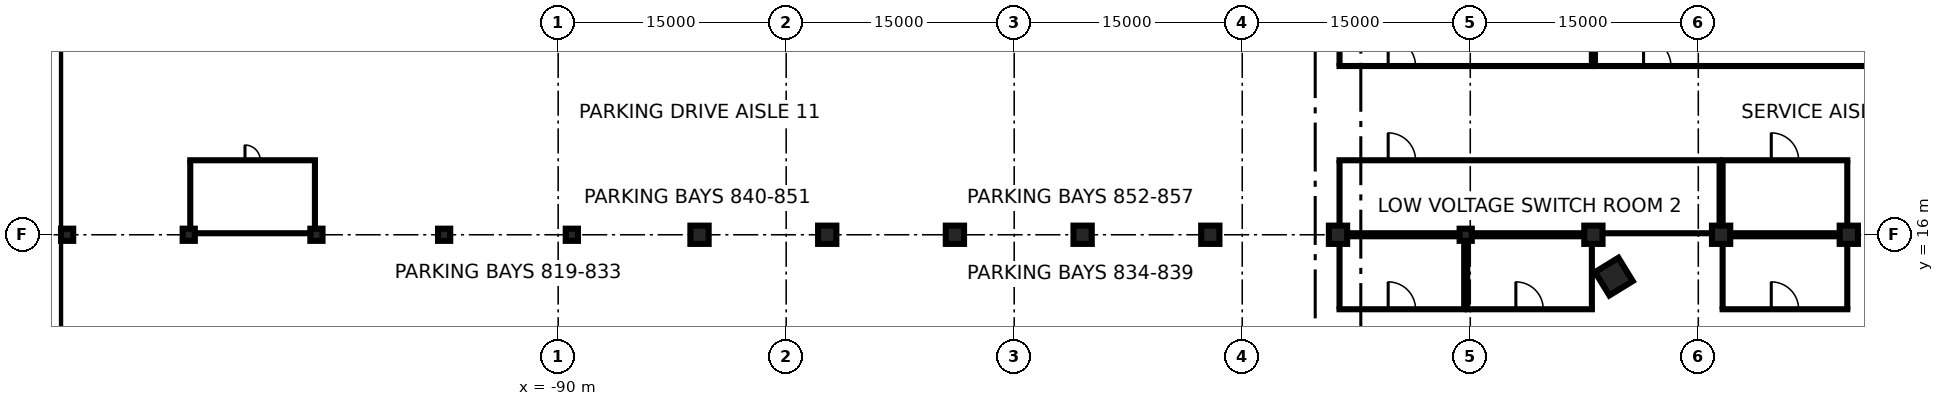
"""IFC4 building model, lengths in metres.
Left out: names, types, materials, properties, quantities, classifications, styles, units other than length and angle.
Written with IfcOpenShell. Run it as: python <this file> out.ifc"""

import sys

from ifc_helpers import new_model, si_unit, direction, frame, frame_2d, origin, origin_2d, place, context, subcontext, project, spatial, rectangle, extrude, element, fill, save


model = new_model("IFC4")
c1 = context("Model", 3, precision=1e-05, world=origin(), true_north=direction((0.0, 1.0)))
c2 = subcontext(c1, "Body", "Model", "MODEL_VIEW")
j1 = project(units=[si_unit("LENGTHUNIT", "METRE"), si_unit("PLANEANGLEUNIT", "RADIAN")], contexts=[c1])
p1 = place(None, origin())
s1 = spatial("IfcSite", under=j1, at=p1, CompositionType="ELEMENT")
p2 = place(p1, origin())
s2 = spatial("IfcBuilding", under=s1, at=p2, CompositionType="ELEMENT")
p3 = place(p2, frame((0.0, 0.0, -12.0)))
s3 = spatial("IfcBuildingStorey", under=s2, at=p3, CompositionType="ELEMENT", Elevation=-12.0)
p4 = place(p3, frame((-123.15, -80.0, 0.0), z_axis=(0.0, 0.0, 1.0), x_axis=(0.0, 1.0, 0.0)))
e1 = element("IfcWall", 1, at=p4, inside=s3, PredefinedType="USERDEFINED", context=c2, shape_type="SweptSolid", body=[
    extrude(rectangle(XDim=160.0, YDim=0.9, at=frame_2d((80.0, 0.0))), origin(), (0.0, 0.0, 1.0), 11.55),
])
p5 = place(p2, frame((0.0, 0.0, -7.2)))
s4 = spatial("IfcBuildingStorey", under=s2, at=p5, CompositionType="ELEMENT", Elevation=-7.2)
p6 = place(p5, frame((-20.552, 13.248, -0.4), z_axis=(0.0, 0.0, 1.0), x_axis=(-0.523429826947, 0.85206878611, 0.0)))
e2 = element("IfcColumn", 2, at=p6, inside=s4, PredefinedType="COLUMN", context=c2, shape_type="SweptSolid", body=[
    extrude(rectangle(XDim=1.8, YDim=1.8, at=origin_2d()), origin(), (0.0, 0.0, 1.0), 3.6),
])
for number, where, z_axis, x_axis in (
    (3, (-122.3, 16.0, -0.4), (0.0, 0.0, 1.0), (1.0, 0.0, 0.0)),
    (4, (-114.3, 16.0, -0.4), (0.0, 0.0, 1.0), (1.0, 0.0, 0.0)),
    (5, (-105.9, 16.0, -0.4), (0.0, 0.0, 1.0), (1.0, 0.0, 0.0)),
    (6, (-97.5, 16.0, -0.4), (0.0, 0.0, 1.0), (1.0, 0.0, 0.0)),
    (7, (-89.1, 16.0, -0.4), (0.0, 0.0, 1.0), (1.0, 0.0, 0.0)),
):
    element("IfcColumn", number, at=place(p5, frame(where, z_axis=z_axis, x_axis=x_axis)), inside=s4, PredefinedType="COLUMN", context=c2, shape_type="SweptSolid", body=[
        extrude(rectangle(XDim=0.8, YDim=0.8, at=origin_2d()), origin(), (0.0, 0.0, 1.0), 3.6),
    ])
for number, where, z_axis, x_axis in (
    (8, (-80.7, 16.0, -0.4), (0.0, 0.0, 1.0), (1.0, 0.0, 0.0)),
    (9, (-72.3, 16.0, -0.4), (0.0, 0.0, 1.0), (1.0, 0.0, 0.0)),
    (10, (-63.9, 16.0, -0.4), (0.0, 0.0, 1.0), (1.0, 0.0, 0.0)),
    (11, (-55.5, 16.0, -0.4), (0.0, 0.0, 1.0), (1.0, 0.0, 0.0)),
    (12, (-47.1, 16.0, -0.4), (0.0, 0.0, 1.0), (1.0, 0.0, 0.0)),
    (13, (-38.7, 16.0, -0.4), (0.0, 0.0, 1.0), (1.0, 0.0, 0.0)),
):
    element("IfcColumn", number, at=place(p5, frame(where, z_axis=z_axis, x_axis=x_axis)), inside=s4, PredefinedType="COLUMN", context=c2, shape_type="SweptSolid", body=[
        extrude(rectangle(XDim=1.2, YDim=1.2, at=origin_2d()), origin(), (0.0, 0.0, 1.0), 3.6),
    ])
p7 = place(p5, frame((-30.3, 16.0, -0.4), z_axis=(0.0, 0.0, 1.0), x_axis=(1.0, 0.0, 0.0)))
e14 = element("IfcColumn", 14, at=p7, inside=s4, PredefinedType="COLUMN", context=c2, shape_type="SweptSolid", body=[
    extrude(rectangle(XDim=0.8, YDim=0.8, at=origin_2d()), origin(), (0.0, 0.0, 1.0), 3.6),
])
for number, where, z_axis, x_axis in (
    (15, (-21.9, 16.0, -0.4), (0.0, 0.0, 1.0), (1.0, 0.0, 0.0)),
    (16, (-13.5, 16.0, -0.4), (0.0, 0.0, 1.0), (1.0, 0.0, 0.0)),
    (17, (-5.1, 16.0, -0.4), (0.0, 0.0, 1.0), (1.0, 0.0, 0.0)),
):
    element("IfcColumn", number, at=place(p5, frame(where, z_axis=z_axis, x_axis=x_axis)), inside=s4, PredefinedType="COLUMN", context=c2, shape_type="SweptSolid", body=[
        extrude(rectangle(XDim=1.2, YDim=1.2, at=origin_2d()), origin(), (0.0, 0.0, 1.0), 3.6),
    ])
p8 = place(p5, frame((-38.7, 11.1, 0.0), z_axis=(0.0, 0.0, 1.0), x_axis=(1.0, 0.0, 0.0)))
e18 = element("IfcWall", 18, at=p8, inside=s4, PredefinedType="PARTITIONING", context=c2, shape_type="SweptSolid", body=[
    extrude(rectangle(XDim=8.4, YDim=0.2, at=frame_2d((4.2, 0.0))), origin(), (0.0, 0.0, 1.0), 3.2),
])
p9 = place(p8, frame((3.3, 0.0, 0.0)))
e19 = element("IfcOpeningElement", 19, at=p9, cuts=e18, PredefinedType="OPENING", context=c2, shape_type="SweptSolid", body=[
    extrude(rectangle(XDim=1.8, YDim=2.1, at=frame_2d((0.9, 1.05))), frame((0.0, 0.11, 0.0), z_axis=(0.0, -1.0, 0.0), x_axis=(1.0, 0.0, 0.0)), (0.0, 0.0, 1.0), 0.22),
])
p10 = place(p5, frame((-38.7, 15.9, 0.0), z_axis=(0.0, 0.0, 1.0), x_axis=(1.0, 0.0, 0.0)))
e20 = element("IfcWall", 20, at=p10, inside=s4, PredefinedType="PARTITIONING", context=c2, shape_type="SweptSolid", body=[
    extrude(rectangle(XDim=8.4, YDim=0.2, at=frame_2d((4.2, 0.0))), origin(), (0.0, 0.0, 1.0), 3.2),
])
p11 = place(p5, frame((-38.6, 11.2, 0.0), z_axis=(0.0, 0.0, 1.0), x_axis=(0.0, 1.0, 0.0)))
e21 = element("IfcWall", 21, at=p11, inside=s4, PredefinedType="PARTITIONING", context=c2, shape_type="SweptSolid", body=[
    extrude(rectangle(XDim=4.2, YDim=0.2, at=frame_2d((2.1, 0.0))), origin(), (0.0, 0.0, 1.0), 3.2),
])
p12 = place(p5, frame((-30.4, 11.2, 0.0), z_axis=(0.0, 0.0, 1.0), x_axis=(0.0, 1.0, 0.0)))
e22 = element("IfcWall", 22, at=p12, inside=s4, PredefinedType="PARTITIONING", context=c2, shape_type="SweptSolid", body=[
    extrude(rectangle(XDim=4.4, YDim=0.2, at=frame_2d((2.2, 0.0))), origin(), (0.0, 0.0, 1.0), 3.2),
])
p13 = place(p5, frame((-30.3, 11.1, 0.0), z_axis=(0.0, 0.0, 1.0), x_axis=(1.0, 0.0, 0.0)))
e23 = element("IfcWall", 23, at=p13, inside=s4, PredefinedType="PARTITIONING", context=c2, shape_type="SweptSolid", body=[
    extrude(rectangle(XDim=8.4, YDim=0.2, at=frame_2d((4.2, 0.0))), origin(), (0.0, 0.0, 1.0), 3.2),
])
p14 = place(p13, frame((3.3, 0.0, 0.0)))
e24 = element("IfcOpeningElement", 24, at=p14, cuts=e23, PredefinedType="OPENING", context=c2, shape_type="SweptSolid", body=[
    extrude(rectangle(XDim=1.8, YDim=2.1, at=frame_2d((0.9, 1.05))), frame((0.0, 0.11, 0.0), z_axis=(0.0, -1.0, 0.0), x_axis=(1.0, 0.0, 0.0)), (0.0, 0.0, 1.0), 0.22),
])
p15 = place(p5, frame((-30.3, 15.9, 0.0), z_axis=(0.0, 0.0, 1.0), x_axis=(1.0, 0.0, 0.0)))
e25 = element("IfcWall", 25, at=p15, inside=s4, PredefinedType="PARTITIONING", context=c2, shape_type="SweptSolid", body=[
    extrude(rectangle(XDim=8.4, YDim=0.2, at=frame_2d((4.2, 0.0))), origin(), (0.0, 0.0, 1.0), 3.2),
])
p16 = place(p5, frame((-30.2, 11.2, 0.0), z_axis=(0.0, 0.0, 1.0), x_axis=(0.0, 1.0, 0.0)))
e26 = element("IfcWall", 26, at=p16, inside=s4, PredefinedType="PARTITIONING", context=c2, shape_type="SweptSolid", body=[
    extrude(rectangle(XDim=4.4, YDim=0.2, at=frame_2d((2.2, 0.0))), origin(), (0.0, 0.0, 1.0), 3.2),
])
p17 = place(p5, frame((-22.0, 11.2, 0.0), z_axis=(0.0, 0.0, 1.0), x_axis=(0.0, 1.0, 0.0)))
e27 = element("IfcWall", 27, at=p17, inside=s4, PredefinedType="PARTITIONING", context=c2, shape_type="SweptSolid", body=[
    extrude(rectangle(XDim=4.2, YDim=0.2, at=frame_2d((2.1, 0.0))), origin(), (0.0, 0.0, 1.0), 3.2),
])
p18 = place(p5, frame((-13.5, 11.1, 0.0), z_axis=(0.0, 0.0, 1.0), x_axis=(1.0, 0.0, 0.0)))
e28 = element("IfcWall", 28, at=p18, inside=s4, PredefinedType="PARTITIONING", context=c2, shape_type="SweptSolid", body=[
    extrude(rectangle(XDim=8.4, YDim=0.2, at=frame_2d((4.2, 0.0))), origin(), (0.0, 0.0, 1.0), 3.2),
])
p19 = place(p18, frame((3.3, 0.0, 0.0)))
e29 = element("IfcOpeningElement", 29, at=p19, cuts=e28, PredefinedType="OPENING", context=c2, shape_type="SweptSolid", body=[
    extrude(rectangle(XDim=1.8, YDim=2.1, at=frame_2d((0.9, 1.05))), frame((0.0, 0.11, 0.0), z_axis=(0.0, -1.0, 0.0), x_axis=(1.0, 0.0, 0.0)), (0.0, 0.0, 1.0), 0.22),
])
p20 = place(p5, frame((-13.5, 15.9, 0.0), z_axis=(0.0, 0.0, 1.0), x_axis=(1.0, 0.0, 0.0)))
e30 = element("IfcWall", 30, at=p20, inside=s4, PredefinedType="PARTITIONING", context=c2, shape_type="SweptSolid", body=[
    extrude(rectangle(XDim=8.4, YDim=0.2, at=frame_2d((4.2, 0.0))), origin(), (0.0, 0.0, 1.0), 3.2),
])
for number, where, z_axis, x_axis in (
    (31, (-13.4, 11.2, 0.0), (0.0, 0.0, 1.0), (0.0, 1.0, 0.0)),
    (32, (-5.2, 11.2, 0.0), (0.0, 0.0, 1.0), (0.0, 1.0, 0.0)),
):
    element("IfcWall", number, at=place(p5, frame(where, z_axis=z_axis, x_axis=x_axis)), inside=s4, PredefinedType="PARTITIONING", context=c2, shape_type="SweptSolid", body=[
        extrude(rectangle(XDim=4.2, YDim=0.2, at=frame_2d((2.1, 0.0))), origin(), (0.0, 0.0, 1.0), 3.2),
    ])
p21 = place(p5, frame((-38.7, 16.1, 0.0), z_axis=(0.0, 0.0, 1.0), x_axis=(1.0, 0.0, 0.0)))
e33 = element("IfcWall", 33, at=p21, inside=s4, PredefinedType="PARTITIONING", context=c2, shape_type="SweptSolid", body=[
    extrude(rectangle(XDim=25.2, YDim=0.2, at=frame_2d((12.6, 0.0))), origin(), (0.0, 0.0, 1.0), 3.2),
])
p22 = place(p5, frame((-38.7, 20.9, 0.0), z_axis=(0.0, 0.0, 1.0), x_axis=(1.0, 0.0, 0.0)))
e34 = element("IfcWall", 34, at=p22, inside=s4, PredefinedType="PARTITIONING", context=c2, shape_type="SweptSolid", body=[
    extrude(rectangle(XDim=25.2, YDim=0.2, at=frame_2d((12.6, 0.0))), origin(), (0.0, 0.0, 1.0), 3.2),
])
p23 = place(p22, frame((3.3, 0.0, 0.0)))
e35 = element("IfcOpeningElement", 35, at=p23, cuts=e34, PredefinedType="OPENING", context=c2, shape_type="SweptSolid", body=[
    extrude(rectangle(XDim=1.8, YDim=2.1, at=frame_2d((0.9, 1.05))), frame((0.0, 0.11, 0.0), z_axis=(0.0, -1.0, 0.0), x_axis=(1.0, 0.0, 0.0)), (0.0, 0.0, 1.0), 0.22),
])
for number, where, z_axis, x_axis in (
    (36, (-38.6, 16.6, 0.0), (0.0, 0.0, 1.0), (0.0, 1.0, 0.0)),
    (37, (-13.6, 16.6, 0.0), (0.0, 0.0, 1.0), (0.0, 1.0, 0.0)),
):
    element("IfcWall", number, at=place(p5, frame(where, z_axis=z_axis, x_axis=x_axis)), inside=s4, PredefinedType="PARTITIONING", context=c2, shape_type="SweptSolid", body=[
        extrude(rectangle(XDim=4.2, YDim=0.2, at=frame_2d((2.1, 0.0))), origin(), (0.0, 0.0, 1.0), 3.2),
    ])
p24 = place(p5, frame((-13.5, 16.1, 0.0), z_axis=(0.0, 0.0, 1.0), x_axis=(1.0, 0.0, 0.0)))
e38 = element("IfcWall", 38, at=p24, inside=s4, PredefinedType="PARTITIONING", context=c2, shape_type="SweptSolid", body=[
    extrude(rectangle(XDim=8.4, YDim=0.2, at=frame_2d((4.2, 0.0))), origin(), (0.0, 0.0, 1.0), 3.2),
])
p25 = place(p5, frame((-13.5, 20.9, 0.0), z_axis=(0.0, 0.0, 1.0), x_axis=(1.0, 0.0, 0.0)))
e39 = element("IfcWall", 39, at=p25, inside=s4, PredefinedType="PARTITIONING", context=c2, shape_type="SweptSolid", body=[
    extrude(rectangle(XDim=8.4, YDim=0.2, at=frame_2d((4.2, 0.0))), origin(), (0.0, 0.0, 1.0), 3.2),
])
p26 = place(p25, frame((3.3, 0.0, 0.0)))
e40 = element("IfcOpeningElement", 40, at=p26, cuts=e39, PredefinedType="OPENING", context=c2, shape_type="SweptSolid", body=[
    extrude(rectangle(XDim=1.8, YDim=2.1, at=frame_2d((0.9, 1.05))), frame((0.0, 0.11, 0.0), z_axis=(0.0, -1.0, 0.0), x_axis=(1.0, 0.0, 0.0)), (0.0, 0.0, 1.0), 0.22),
])
for number, where, z_axis, x_axis in (
    (41, (-13.4, 16.6, 0.0), (0.0, 0.0, 1.0), (0.0, 1.0, 0.0)),
    (42, (-5.2, 16.6, 0.0), (0.0, 0.0, 1.0), (0.0, 1.0, 0.0)),
):
    element("IfcWall", number, at=place(p5, frame(where, z_axis=z_axis, x_axis=x_axis)), inside=s4, PredefinedType="PARTITIONING", context=c2, shape_type="SweptSolid", body=[
        extrude(rectangle(XDim=4.2, YDim=0.2, at=frame_2d((2.1, 0.0))), origin(), (0.0, 0.0, 1.0), 3.2),
    ])
p27 = place(p5, frame((-38.7, 27.1, 0.0), z_axis=(0.0, 0.0, 1.0), x_axis=(1.0, 0.0, 0.0)))
e43 = element("IfcWall", 43, at=p27, inside=s4, PredefinedType="PARTITIONING", context=c2, shape_type="SweptSolid", body=[
    extrude(rectangle(XDim=16.8, YDim=0.2, at=frame_2d((8.4, 0.0))), origin(), (0.0, 0.0, 1.0), 3.2),
])
p28 = place(p27, frame((3.3, 0.0, 0.0)))
e44 = element("IfcOpeningElement", 44, at=p28, cuts=e43, PredefinedType="OPENING", context=c2, shape_type="SweptSolid", body=[
    extrude(rectangle(XDim=1.8, YDim=2.1, at=frame_2d((0.9, 1.05))), frame((0.0, 0.11, 0.0), z_axis=(0.0, -1.0, 0.0), x_axis=(1.0, 0.0, 0.0)), (0.0, 0.0, 1.0), 0.22),
])
for number, where, z_axis, x_axis in (
    (45, (-38.6, 27.2, 0.0), (0.0, 0.0, 1.0), (0.0, 1.0, 0.0)),
    (46, (-22.0, 27.2, 0.0), (0.0, 0.0, 1.0), (0.0, 1.0, 0.0)),
):
    element("IfcWall", number, at=place(p5, frame(where, z_axis=z_axis, x_axis=x_axis)), inside=s4, PredefinedType="PARTITIONING", context=c2, shape_type="SweptSolid", body=[
        extrude(rectangle(XDim=4.4, YDim=0.2, at=frame_2d((2.2, 0.0))), origin(), (0.0, 0.0, 1.0), 3.2),
    ])
p29 = place(p5, frame((-21.9, 27.1, 0.0), z_axis=(0.0, 0.0, 1.0), x_axis=(1.0, 0.0, 0.0)))
e47 = element("IfcWall", 47, at=p29, inside=s4, PredefinedType="PARTITIONING", context=c2, shape_type="SweptSolid", body=[
    extrude(rectangle(XDim=25.2, YDim=0.2, at=frame_2d((12.6, 0.0))), origin(), (0.0, 0.0, 1.0), 3.2),
])
p30 = place(p29, frame((3.3, 0.0, 0.0)))
e48 = element("IfcOpeningElement", 48, at=p30, cuts=e47, PredefinedType="OPENING", context=c2, shape_type="SweptSolid", body=[
    extrude(rectangle(XDim=1.8, YDim=2.1, at=frame_2d((0.9, 1.05))), frame((0.0, 0.11, 0.0), z_axis=(0.0, -1.0, 0.0), x_axis=(1.0, 0.0, 0.0)), (0.0, 0.0, 1.0), 0.22),
])
p31 = place(p5, frame((-21.8, 27.2, 0.0), z_axis=(0.0, 0.0, 1.0), x_axis=(0.0, 1.0, 0.0)))
e49 = element("IfcWall", 49, at=p31, inside=s4, PredefinedType="PARTITIONING", context=c2, shape_type="SweptSolid", body=[
    extrude(rectangle(XDim=4.4, YDim=0.2, at=frame_2d((2.2, 0.0))), origin(), (0.0, 0.0, 1.0), 3.2),
])
p32 = place(p5, frame((-114.3, 16.1, 0.0), z_axis=(0.0, 0.0, 1.0), x_axis=(1.0, 0.0, 0.0)))
e50 = element("IfcWall", 50, at=p32, inside=s4, PredefinedType="PARTITIONING", context=c2, shape_type="SweptSolid", body=[
    extrude(rectangle(XDim=8.4, YDim=0.2, at=frame_2d((4.2, 0.0))), origin(), (0.0, 0.0, 1.0), 3.2),
])
p33 = place(p5, frame((-114.3, 20.9, 0.0), z_axis=(0.0, 0.0, 1.0), x_axis=(1.0, 0.0, 0.0)))
e51 = element("IfcWall", 51, at=p33, inside=s4, PredefinedType="PARTITIONING", context=c2, shape_type="SweptSolid", body=[
    extrude(rectangle(XDim=8.4, YDim=0.2, at=frame_2d((4.2, 0.0))), origin(), (0.0, 0.0, 1.0), 3.2),
])
p34 = place(p33, frame((3.7, 0.0, 0.0)))
e52 = element("IfcOpeningElement", 52, at=p34, cuts=e51, PredefinedType="OPENING", context=c2, shape_type="SweptSolid", body=[
    extrude(rectangle(XDim=1.0, YDim=2.1, at=frame_2d((0.5, 1.05))), frame((0.0, 0.11, 0.0), z_axis=(0.0, -1.0, 0.0), x_axis=(1.0, 0.0, 0.0)), (0.0, 0.0, 1.0), 0.22),
])
for number, where, z_axis, x_axis in (
    (53, (-114.2, 16.4, 0.0), (0.0, 0.0, 1.0), (0.0, 1.0, 0.0)),
    (54, (-106.0, 16.4, 0.0), (0.0, 0.0, 1.0), (0.0, 1.0, 0.0)),
):
    element("IfcWall", number, at=place(p5, frame(where, z_axis=z_axis, x_axis=x_axis)), inside=s4, PredefinedType="PARTITIONING", context=c2, shape_type="SweptSolid", body=[
        extrude(rectangle(XDim=4.4, YDim=0.2, at=frame_2d((2.2, 0.0))), origin(), (0.0, 0.0, 1.0), 3.2),
    ])
p35 = place(p9, origin())
e55 = element("IfcDoor", 55, at=p35, inside=s4, OperationType="DOUBLE_DOOR_SINGLE_SWING", PredefinedType="DOOR", context=c2, shape_type="SweptSolid", body=[
    extrude(rectangle(XDim=1.8, YDim=2.1, at=frame_2d((0.9, 1.05))), frame((0.0, 0.025, 0.0), z_axis=(0.0, -1.0, 0.0), x_axis=(1.0, 0.0, 0.0)), (0.0, 0.0, 1.0), 0.05),
])
fill(e19, e55)
p36 = place(p14, origin())
e56 = element("IfcDoor", 56, at=p36, inside=s4, OperationType="DOUBLE_DOOR_SINGLE_SWING", PredefinedType="DOOR", context=c2, shape_type="SweptSolid", body=[
    extrude(rectangle(XDim=1.8, YDim=2.1, at=frame_2d((0.9, 1.05))), frame((0.0, 0.025, 0.0), z_axis=(0.0, -1.0, 0.0), x_axis=(1.0, 0.0, 0.0)), (0.0, 0.0, 1.0), 0.05),
])
fill(e24, e56)
p37 = place(p19, origin())
e57 = element("IfcDoor", 57, at=p37, inside=s4, OperationType="DOUBLE_DOOR_SINGLE_SWING", PredefinedType="DOOR", context=c2, shape_type="SweptSolid", body=[
    extrude(rectangle(XDim=1.8, YDim=2.1, at=frame_2d((0.9, 1.05))), frame((0.0, 0.025, 0.0), z_axis=(0.0, -1.0, 0.0), x_axis=(1.0, 0.0, 0.0)), (0.0, 0.0, 1.0), 0.05),
])
fill(e29, e57)
p38 = place(p23, origin())
e58 = element("IfcDoor", 58, at=p38, inside=s4, OperationType="DOUBLE_DOOR_SINGLE_SWING", PredefinedType="DOOR", context=c2, shape_type="SweptSolid", body=[
    extrude(rectangle(XDim=1.8, YDim=2.1, at=frame_2d((0.9, 1.05))), frame((0.0, 0.025, 0.0), z_axis=(0.0, -1.0, 0.0), x_axis=(1.0, 0.0, 0.0)), (0.0, 0.0, 1.0), 0.05),
])
fill(e35, e58)
p39 = place(p26, origin())
e59 = element("IfcDoor", 59, at=p39, inside=s4, OperationType="DOUBLE_DOOR_SINGLE_SWING", PredefinedType="DOOR", context=c2, shape_type="SweptSolid", body=[
    extrude(rectangle(XDim=1.8, YDim=2.1, at=frame_2d((0.9, 1.05))), frame((0.0, 0.025, 0.0), z_axis=(0.0, -1.0, 0.0), x_axis=(1.0, 0.0, 0.0)), (0.0, 0.0, 1.0), 0.05),
])
fill(e40, e59)
p40 = place(p28, origin())
e60 = element("IfcDoor", 60, at=p40, inside=s4, OperationType="DOUBLE_DOOR_SINGLE_SWING", PredefinedType="DOOR", context=c2, shape_type="SweptSolid", body=[
    extrude(rectangle(XDim=1.8, YDim=2.1, at=frame_2d((0.9, 1.05))), frame((0.0, 0.025, 0.0), z_axis=(0.0, -1.0, 0.0), x_axis=(1.0, 0.0, 0.0)), (0.0, 0.0, 1.0), 0.05),
])
fill(e44, e60)
p41 = place(p30, origin())
e61 = element("IfcDoor", 61, at=p41, inside=s4, OperationType="DOUBLE_DOOR_SINGLE_SWING", PredefinedType="DOOR", context=c2, shape_type="SweptSolid", body=[
    extrude(rectangle(XDim=1.8, YDim=2.1, at=frame_2d((0.9, 1.05))), frame((0.0, 0.025, 0.0), z_axis=(0.0, -1.0, 0.0), x_axis=(1.0, 0.0, 0.0)), (0.0, 0.0, 1.0), 0.05),
])
fill(e48, e61)
p42 = place(p34, origin())
e62 = element("IfcDoor", 62, at=p42, inside=s4, OperationType="SINGLE_SWING_LEFT", PredefinedType="DOOR", context=c2, shape_type="SweptSolid", body=[
    extrude(rectangle(XDim=1.0, YDim=2.1, at=frame_2d((0.5, 1.05))), frame((0.0, 0.025, 0.0), z_axis=(0.0, -1.0, 0.0), x_axis=(1.0, 0.0, 0.0)), (0.0, 0.0, 1.0), 0.05),
])
fill(e52, e62)
save(model, sys.argv[1])
